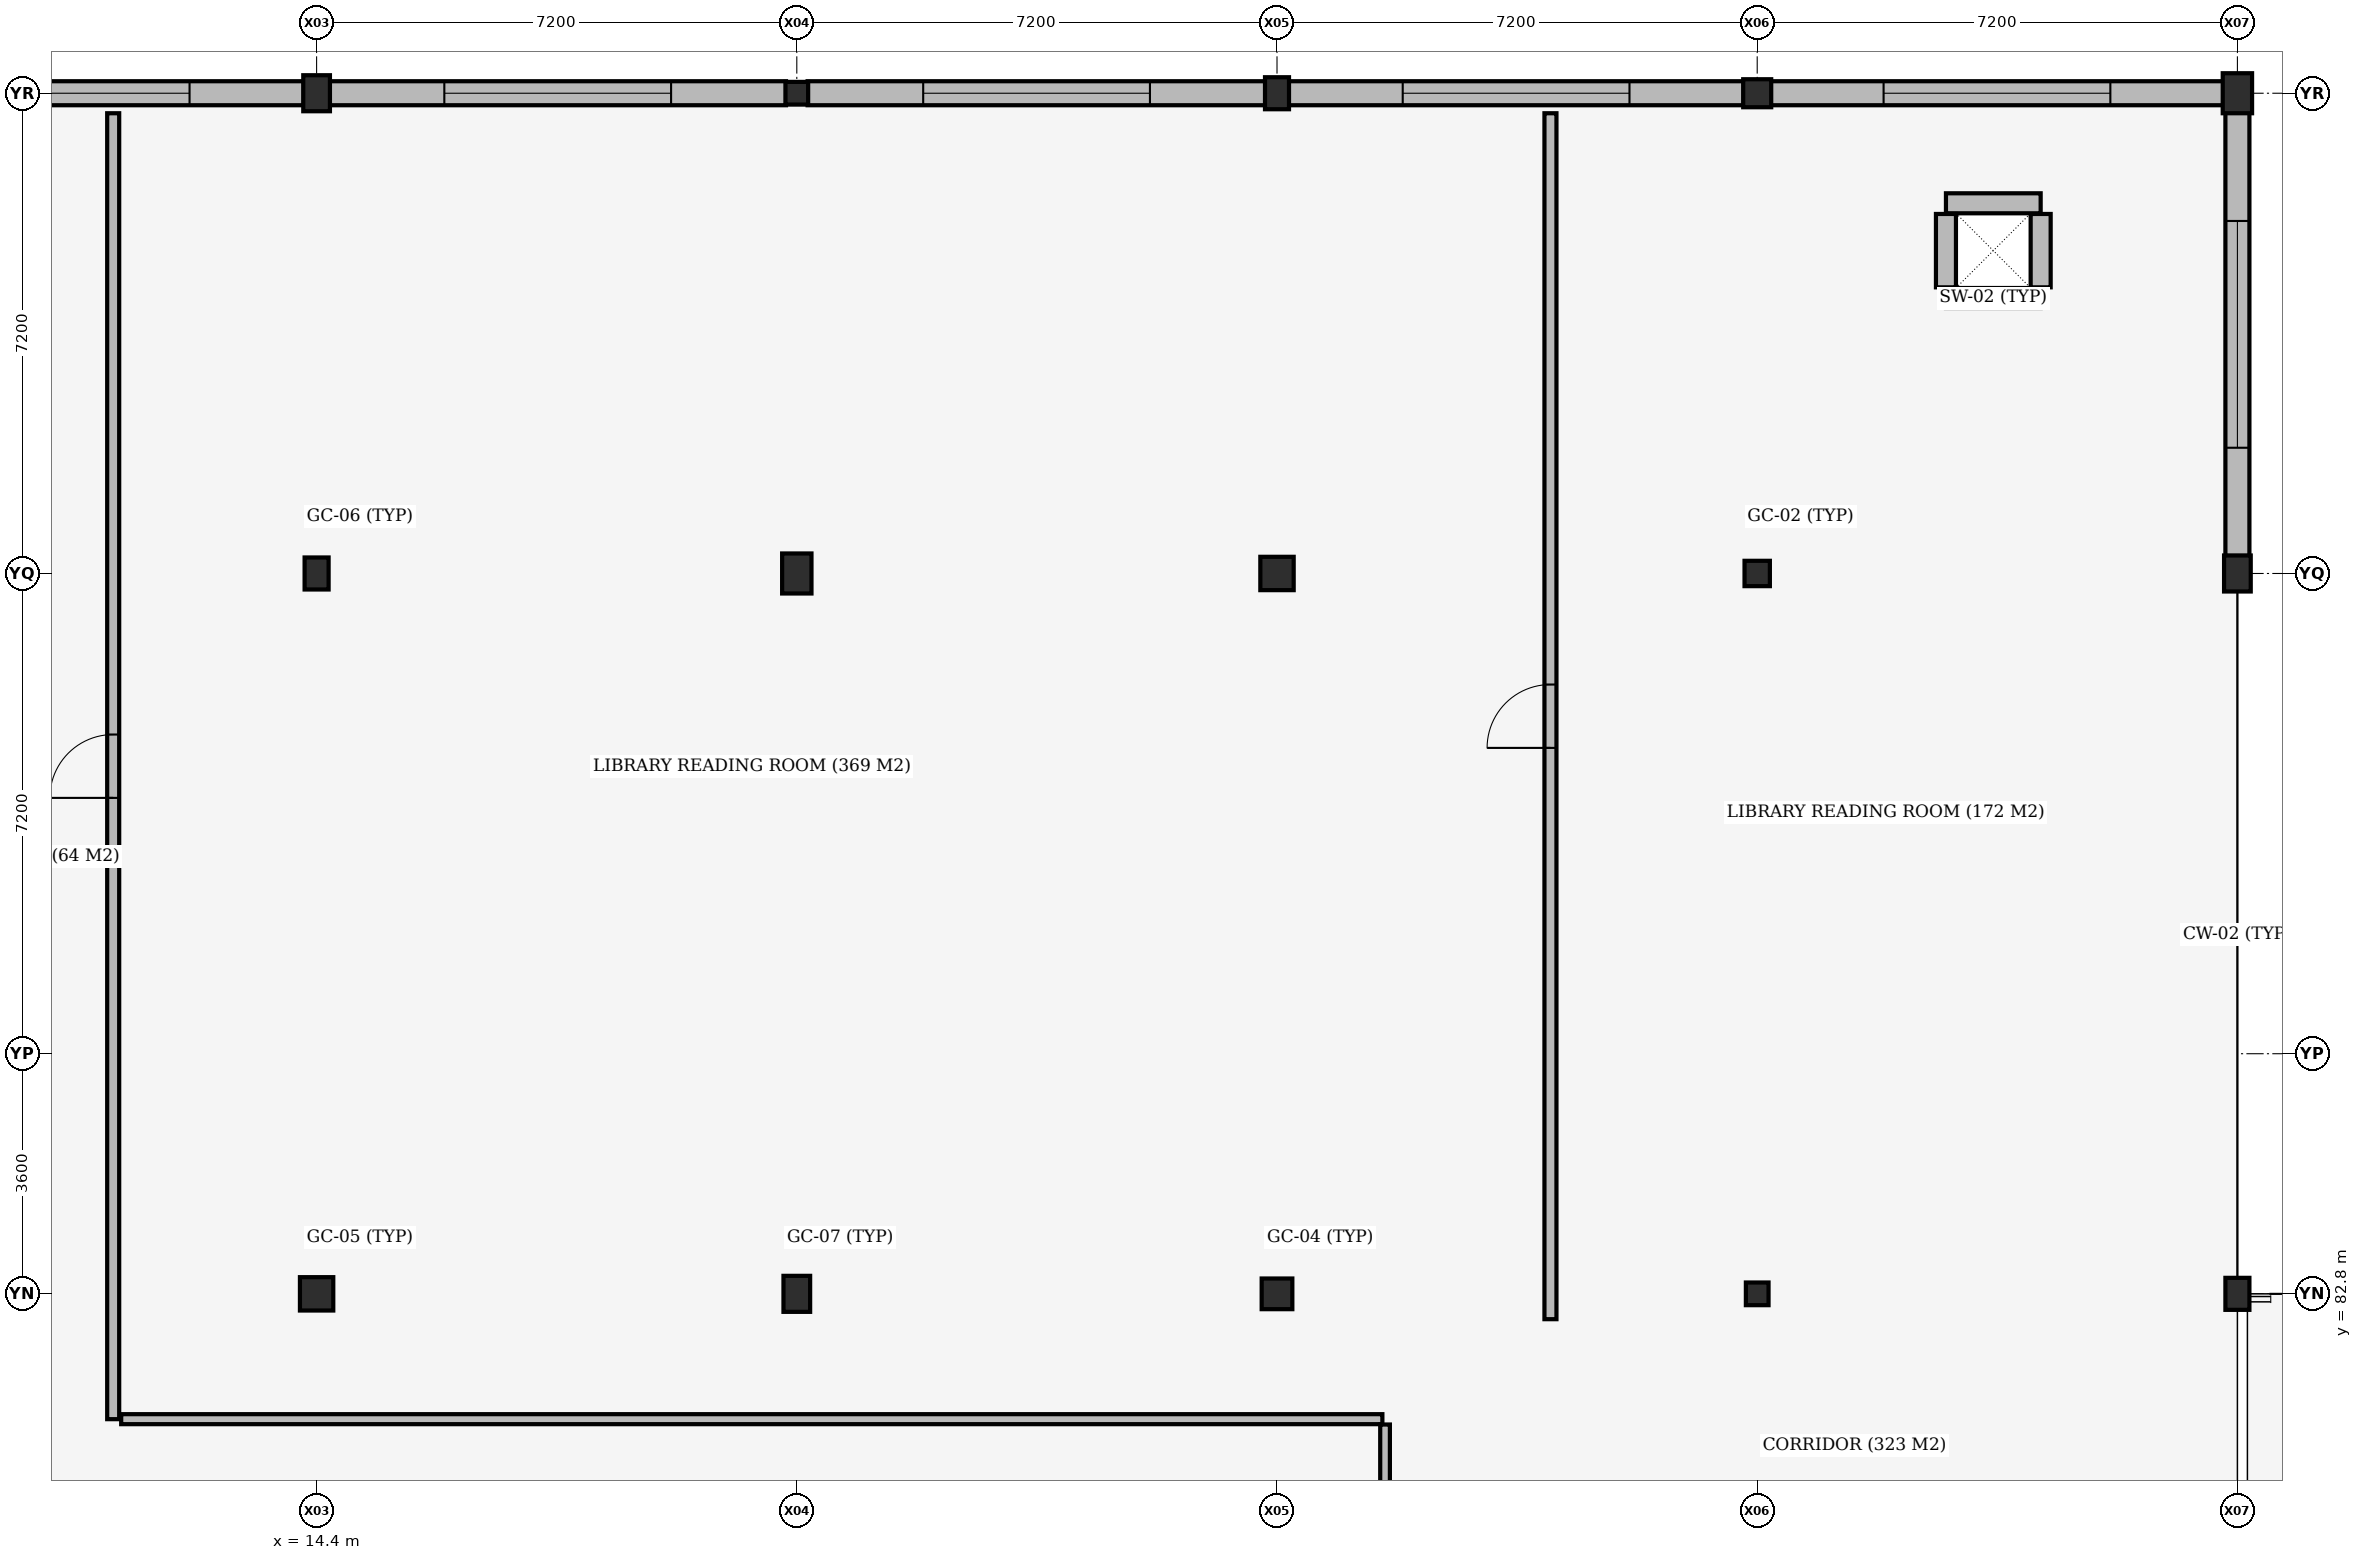
"""IFC4 building model, lengths in metres.
Left out: names, types, materials, properties, quantities, classifications, styles, units other than length and angle.
Written with IfcOpenShell. Run it as: python <this file> out.ifc"""

import sys

from ifc_helpers import new_model, si_unit, direction, frame, frame_2d, origin, origin_2d, place, context, subcontext, project, spatial, rectangle, extrude, element, fill, save


model = new_model("IFC4")
c1 = context("Model", 3, precision=1e-05, world=origin(), true_north=direction((0.0, 1.0)))
c2 = subcontext(c1, "Body", "Model", "MODEL_VIEW")
j1 = project(units=[si_unit("LENGTHUNIT", "METRE"), si_unit("PLANEANGLEUNIT", "RADIAN")], contexts=[c1])
p1 = place(None, origin())
s1 = spatial("IfcSite", under=j1, at=p1, CompositionType="ELEMENT")
p2 = place(p1, origin())
s2 = spatial("IfcBuilding", under=s1, at=p2, CompositionType="ELEMENT")
p3 = place(p2, frame((0.0, 0.0, 9.6)))
s3 = spatial("IfcBuildingStorey", under=s2, at=p3, CompositionType="ELEMENT", Elevation=9.6)
p4 = place(p3, frame((38.83, 97.73, 0.0), z_axis=(0.0, 0.0, 1.0), x_axis=(1.0, 0.0, 0.0)))
e1 = element("IfcWall", 1, at=p4, inside=s3, PredefinedType="SHEAR", context=c2, shape_type="SweptSolid", body=[
    extrude(rectangle(XDim=1.42, YDim=0.3, at=frame_2d((0.71, 0.0))), origin(), (0.0, 0.0, 1.0), 3.96),
])
p5 = place(p3, frame((40.25, 97.89, 0.0), z_axis=(0.0, 0.0, 1.0), x_axis=(0.0, 1.0, 0.0)))
e2 = element("IfcWall", 2, at=p5, inside=s3, PredefinedType="SHEAR", context=c2, shape_type="SweptSolid", body=[
    extrude(rectangle(XDim=1.1, YDim=0.3, at=frame_2d((0.55, 0.0))), origin(), (0.0, 0.0, 1.0), 3.96),
])
p6 = place(p3, frame((40.25, 99.15, 0.0), z_axis=(0.0, 0.0, 1.0), x_axis=(-1.0, 0.0, 0.0)))
e3 = element("IfcWall", 3, at=p6, inside=s3, PredefinedType="SHEAR", context=c2, shape_type="SweptSolid", body=[
    extrude(rectangle(XDim=1.42, YDim=0.3, at=frame_2d((0.71, 0.0))), origin(), (0.0, 0.0, 1.0), 3.96),
])
p7 = place(p3, frame((38.83, 98.99, 0.0), z_axis=(0.0, 0.0, 1.0), x_axis=(0.0, -1.0, 0.0)))
e4 = element("IfcWall", 4, at=p7, inside=s3, PredefinedType="SHEAR", context=c2, shape_type="SweptSolid", body=[
    extrude(rectangle(XDim=1.1, YDim=0.3, at=frame_2d((0.55, 0.0))), origin(), (0.0, 0.0, 1.0), 3.96),
])
p8 = place(p3, frame((14.4, 82.8, 0.0), z_axis=(0.0, 0.0, 1.0), x_axis=(1.0, 0.0, 0.0)))
e5 = element("IfcColumn", 5, at=p8, inside=s3, PredefinedType="COLUMN", context=c2, shape_type="SweptSolid", body=[
    extrude(rectangle(XDim=0.5, YDim=0.5, at=origin_2d()), origin(), (0.0, 0.0, 1.0), 3.89),
])
p9 = place(p3, frame((14.4, 93.6, 0.0), z_axis=(0.0, 0.0, 1.0), x_axis=(1.0, 0.0, 0.0)))
e6 = element("IfcColumn", 6, at=p9, inside=s3, PredefinedType="COLUMN", context=c2, shape_type="SweptSolid", body=[
    extrude(rectangle(XDim=0.36, YDim=0.48, at=origin_2d()), origin(), (0.0, 0.0, 1.0), 3.89),
])
for number, where, z_axis, x_axis in (
    (7, (14.4, 100.8, 0.0), (0.0, 0.0, 1.0), (1.0, 0.0, 0.0)),
    (8, (21.6, 82.8, 0.0), (0.0, 0.0, 1.0), (1.0, 0.0, 0.0)),
):
    element("IfcColumn", number, at=place(p3, frame(where, z_axis=z_axis, x_axis=x_axis)), inside=s3, PredefinedType="COLUMN", context=c2, shape_type="SweptSolid", body=[
        extrude(rectangle(XDim=0.4, YDim=0.54, at=origin_2d()), origin(), (0.0, 0.0, 1.0), 3.89),
    ])
p10 = place(p3, frame((21.6, 93.6, 0.0), z_axis=(0.0, 0.0, 1.0), x_axis=(1.0, 0.0, 0.0)))
e9 = element("IfcColumn", 9, at=p10, inside=s3, PredefinedType="COLUMN", context=c2, shape_type="SweptSolid", body=[
    extrude(rectangle(XDim=0.44, YDim=0.6, at=origin_2d()), origin(), (0.0, 0.0, 1.0), 3.89),
])
p11 = place(p3, frame((21.6, 100.8, 0.0), z_axis=(0.0, 0.0, 1.0), x_axis=(1.0, 0.0, 0.0)))
e10 = element("IfcColumn", 10, at=p11, inside=s3, PredefinedType="COLUMN", context=c2, shape_type="SweptSolid", body=[
    extrude(rectangle(XDim=0.34, YDim=0.34, at=origin_2d()), origin(), (0.0, 0.0, 1.0), 3.89),
])
p12 = place(p3, frame((28.8, 82.8, 0.0), z_axis=(0.0, 0.0, 1.0), x_axis=(1.0, 0.0, 0.0)))
e11 = element("IfcColumn", 11, at=p12, inside=s3, PredefinedType="COLUMN", context=c2, shape_type="SweptSolid", body=[
    extrude(rectangle(XDim=0.46, YDim=0.46, at=origin_2d()), origin(), (0.0, 0.0, 1.0), 3.89),
])
p13 = place(p3, frame((28.8, 93.6, 0.0), z_axis=(0.0, 0.0, 1.0), x_axis=(1.0, 0.0, 0.0)))
e12 = element("IfcColumn", 12, at=p13, inside=s3, PredefinedType="COLUMN", context=c2, shape_type="SweptSolid", body=[
    extrude(rectangle(XDim=0.5, YDim=0.5, at=origin_2d()), origin(), (0.0, 0.0, 1.0), 3.89),
])
p14 = place(p3, frame((28.8, 100.8, 0.0), z_axis=(0.0, 0.0, 1.0), x_axis=(1.0, 0.0, 0.0)))
e13 = element("IfcColumn", 13, at=p14, inside=s3, PredefinedType="COLUMN", context=c2, shape_type="SweptSolid", body=[
    extrude(rectangle(XDim=0.36, YDim=0.48, at=origin_2d()), origin(), (0.0, 0.0, 1.0), 3.89),
])
p15 = place(p3, frame((36.0, 82.8, 0.0), z_axis=(0.0, 0.0, 1.0), x_axis=(1.0, 0.0, 0.0)))
e14 = element("IfcColumn", 14, at=p15, inside=s3, PredefinedType="COLUMN", context=c2, shape_type="SweptSolid", body=[
    extrude(rectangle(XDim=0.34, YDim=0.34, at=origin_2d()), origin(), (0.0, 0.0, 1.0), 3.89),
])
p16 = place(p3, frame((36.0, 93.6, 0.0), z_axis=(0.0, 0.0, 1.0), x_axis=(1.0, 0.0, 0.0)))
e15 = element("IfcColumn", 15, at=p16, inside=s3, PredefinedType="COLUMN", context=c2, shape_type="SweptSolid", body=[
    extrude(rectangle(XDim=0.38, YDim=0.38, at=origin_2d()), origin(), (0.0, 0.0, 1.0), 3.89),
])
p17 = place(p3, frame((36.0, 100.8, 0.0), z_axis=(0.0, 0.0, 1.0), x_axis=(1.0, 0.0, 0.0)))
e16 = element("IfcColumn", 16, at=p17, inside=s3, PredefinedType="COLUMN", context=c2, shape_type="SweptSolid", body=[
    extrude(rectangle(XDim=0.42, YDim=0.42, at=origin_2d()), origin(), (0.0, 0.0, 1.0), 3.89),
])
p18 = place(p3, frame((43.2, 82.8, 0.0), z_axis=(0.0, 0.0, 1.0), x_axis=(1.0, 0.0, 0.0)))
e17 = element("IfcColumn", 17, at=p18, inside=s3, PredefinedType="COLUMN", context=c2, shape_type="SweptSolid", body=[
    extrude(rectangle(XDim=0.36, YDim=0.48, at=origin_2d()), origin(), (0.0, 0.0, 1.0), 3.89),
])
p19 = place(p3, frame((43.2, 93.6, 0.0), z_axis=(0.0, 0.0, 1.0), x_axis=(1.0, 0.0, 0.0)))
e18 = element("IfcColumn", 18, at=p19, inside=s3, PredefinedType="COLUMN", context=c2, shape_type="SweptSolid", body=[
    extrude(rectangle(XDim=0.4, YDim=0.54, at=origin_2d()), origin(), (0.0, 0.0, 1.0), 3.89),
])
p20 = place(p3, frame((43.2, 100.8, 0.0), z_axis=(0.0, 0.0, 1.0), x_axis=(1.0, 0.0, 0.0)))
e19 = element("IfcColumn", 19, at=p20, inside=s3, PredefinedType="COLUMN", context=c2, shape_type="SweptSolid", body=[
    extrude(rectangle(XDim=0.44, YDim=0.6, at=origin_2d()), origin(), (0.0, 0.0, 1.0), 3.89),
])
p21 = place(p3, frame((7.382, 100.8, 0.0), z_axis=(0.0, 0.0, 1.0), x_axis=(1.0, 0.0, 0.0)))
e20 = element("IfcWall", 20, at=p21, inside=s3, PredefinedType="STANDARD", context=c2, shape_type="SweptSolid", body=[
    extrude(rectangle(XDim=6.826, YDim=0.36, at=frame_2d((3.413, 0.0))), origin(), (0.0, 0.0, 1.0), 3.25),
])
p22 = place(p21, frame((1.713, 0.0, 0.9)))
e21 = element("IfcOpeningElement", 21, at=p22, cuts=e20, PredefinedType="OPENING", context=c2, shape_type="SweptSolid", body=[
    extrude(rectangle(XDim=3.4, YDim=1.5, at=frame_2d((1.7, 0.75))), frame((0.0, 0.19, 0.0), z_axis=(0.0, -1.0, 0.0), x_axis=(1.0, 0.0, 0.0)), (0.0, 0.0, 1.0), 0.38),
])
p23 = place(p3, frame((14.592, 100.8, 0.0), z_axis=(0.0, 0.0, 1.0), x_axis=(1.0, 0.0, 0.0)))
e22 = element("IfcWall", 22, at=p23, inside=s3, PredefinedType="STANDARD", context=c2, shape_type="SweptSolid", body=[
    extrude(rectangle(XDim=6.846, YDim=0.36, at=frame_2d((3.423, 0.0))), origin(), (0.0, 0.0, 1.0), 3.15),
])
p24 = place(p23, frame((1.723, 0.0, 0.9)))
e23 = element("IfcOpeningElement", 23, at=p24, cuts=e22, PredefinedType="OPENING", context=c2, shape_type="SweptSolid", body=[
    extrude(rectangle(XDim=3.4, YDim=1.5, at=frame_2d((1.7, 0.75))), frame((0.0, 0.19, 0.0), z_axis=(0.0, -1.0, 0.0), x_axis=(1.0, 0.0, 0.0)), (0.0, 0.0, 1.0), 0.38),
])
p25 = place(p3, frame((21.762, 100.8, 0.0), z_axis=(0.0, 0.0, 1.0), x_axis=(1.0, 0.0, 0.0)))
e24 = element("IfcWall", 24, at=p25, inside=s3, PredefinedType="STANDARD", context=c2, shape_type="SweptSolid", body=[
    extrude(rectangle(XDim=6.866, YDim=0.36, at=frame_2d((3.433, 0.0))), origin(), (0.0, 0.0, 1.0), 3.15),
])
p26 = place(p25, frame((1.733, 0.0, 0.9)))
e25 = element("IfcOpeningElement", 25, at=p26, cuts=e24, PredefinedType="OPENING", context=c2, shape_type="SweptSolid", body=[
    extrude(rectangle(XDim=3.4, YDim=1.5, at=frame_2d((1.7, 0.75))), frame((0.0, 0.19, 0.0), z_axis=(0.0, -1.0, 0.0), x_axis=(1.0, 0.0, 0.0)), (0.0, 0.0, 1.0), 0.38),
])
p27 = place(p3, frame((28.972, 100.8, 0.0), z_axis=(0.0, 0.0, 1.0), x_axis=(1.0, 0.0, 0.0)))
e26 = element("IfcWall", 26, at=p27, inside=s3, PredefinedType="STANDARD", context=c2, shape_type="SweptSolid", body=[
    extrude(rectangle(XDim=6.826, YDim=0.36, at=frame_2d((3.413, 0.0))), origin(), (0.0, 0.0, 1.0), 3.37),
])
p28 = place(p27, frame((1.713, 0.0, 0.9)))
e27 = element("IfcOpeningElement", 27, at=p28, cuts=e26, PredefinedType="OPENING", context=c2, shape_type="SweptSolid", body=[
    extrude(rectangle(XDim=3.4, YDim=1.5, at=frame_2d((1.7, 0.75))), frame((0.0, 0.19, 0.0), z_axis=(0.0, -1.0, 0.0), x_axis=(1.0, 0.0, 0.0)), (0.0, 0.0, 1.0), 0.38),
])
p29 = place(p3, frame((36.202, 100.8, 0.0), z_axis=(0.0, 0.0, 1.0), x_axis=(1.0, 0.0, 0.0)))
e28 = element("IfcWall", 28, at=p29, inside=s3, PredefinedType="STANDARD", context=c2, shape_type="SweptSolid", body=[
    extrude(rectangle(XDim=6.786, YDim=0.36, at=frame_2d((3.393, 0.0))), origin(), (0.0, 0.0, 1.0), 3.31),
])
p30 = place(p29, frame((1.693, 0.0, 0.9)))
e29 = element("IfcOpeningElement", 29, at=p30, cuts=e28, PredefinedType="OPENING", context=c2, shape_type="SweptSolid", body=[
    extrude(rectangle(XDim=3.4, YDim=1.5, at=frame_2d((1.7, 0.75))), frame((0.0, 0.19, 0.0), z_axis=(0.0, -1.0, 0.0), x_axis=(1.0, 0.0, 0.0)), (0.0, 0.0, 1.0), 0.38),
])
p31 = place(p3, frame((43.2, 100.508, 0.0), z_axis=(0.0, 0.0, 1.0), x_axis=(0.0, -1.0, 0.0)))
e30 = element("IfcWall", 30, at=p31, inside=s3, PredefinedType="STANDARD", context=c2, shape_type="SweptSolid", body=[
    extrude(rectangle(XDim=6.646, YDim=0.36, at=frame_2d((3.323, 0.0))), origin(), (0.0, 0.0, 1.0), 3.15),
])
p32 = place(p31, frame((1.623, 0.0, 0.9)))
e31 = element("IfcOpeningElement", 31, at=p32, cuts=e30, PredefinedType="OPENING", context=c2, shape_type="SweptSolid", body=[
    extrude(rectangle(XDim=3.4, YDim=1.5, at=frame_2d((1.7, 0.75))), frame((0.0, 0.19, 0.0), z_axis=(0.0, -1.0, 0.0), x_axis=(1.0, 0.0, 0.0)), (0.0, 0.0, 1.0), 0.38),
])
p33 = place(p3, frame((11.47, 80.921, 0.0), z_axis=(0.0, 0.0, 1.0), x_axis=(1.0, 0.0, 0.0)))
e32 = element("IfcWall", 32, at=p33, inside=s3, PredefinedType="PARTITIONING", context=c2, shape_type="SweptSolid", body=[
    extrude(rectangle(XDim=18.91, YDim=0.15, at=frame_2d((9.455, 0.0))), origin(), (0.0, 0.0, 1.0), 3.15),
])
p34 = place(p3, frame((11.35, 80.921, 0.0), z_axis=(0.0, 0.0, 1.0), x_axis=(0.0, 1.0, 0.0)))
e33 = element("IfcWall", 33, at=p34, inside=s3, PredefinedType="PARTITIONING", context=c2, shape_type="SweptSolid", body=[
    extrude(rectangle(XDim=19.579, YDim=0.18, at=frame_2d((9.79, 0.0))), origin(), (0.0, 0.0, 1.0), 3.31),
])
p35 = place(p34, frame((9.314, 0.0, 0.0)))
e34 = element("IfcOpeningElement", 34, at=p35, cuts=e33, PredefinedType="OPENING", context=c2, shape_type="SweptSolid", body=[
    extrude(rectangle(XDim=0.95, YDim=2.15, at=frame_2d((0.475, 1.075))), frame((0.0, 0.1, 0.0), z_axis=(0.0, -1.0, 0.0), x_axis=(1.0, 0.0, 0.0)), (0.0, 0.0, 1.0), 0.2),
])
p36 = place(p3, frame((32.9, 82.42, 0.0), z_axis=(0.0, 0.0, 1.0), x_axis=(0.0, 1.0, 0.0)))
e35 = element("IfcWall", 35, at=p36, inside=s3, PredefinedType="PARTITIONING", context=c2, shape_type="SweptSolid", body=[
    extrude(rectangle(XDim=18.08, YDim=0.18, at=frame_2d((9.04, 0.0))), origin(), (0.0, 0.0, 1.0), 3.15),
])
p37 = place(p36, frame((8.565, 0.0, 0.0)))
e36 = element("IfcOpeningElement", 36, at=p37, cuts=e35, PredefinedType="OPENING", context=c2, shape_type="SweptSolid", body=[
    extrude(rectangle(XDim=0.95, YDim=2.15, at=frame_2d((0.475, 1.075))), frame((0.0, 0.1, 0.0), z_axis=(0.0, -1.0, 0.0), x_axis=(1.0, 0.0, 0.0)), (0.0, 0.0, 1.0), 0.2),
])
p38 = place(p3, frame((30.42, 80.841, 0.0), z_axis=(0.0, 0.0, 1.0), x_axis=(0.0, -1.0, 0.0)))
e37 = element("IfcWall", 37, at=p38, inside=s3, PredefinedType="PLUMBINGWALL", context=c2, shape_type="SweptSolid", body=[
    extrude(rectangle(XDim=29.208, YDim=0.145, at=frame_2d((14.604, 0.0))), origin(), (0.0, 0.0, 1.0), 3.25),
])
p39 = place(p38, frame((14.154, 0.0, 0.0)))
e38 = element("IfcOpeningElement", 38, at=p39, cuts=e37, PredefinedType="OPENING", context=c2, shape_type="SweptSolid", body=[
    extrude(rectangle(XDim=0.9, YDim=2.1, at=frame_2d((0.45, 1.05))), frame((0.0, 0.083, 0.0), z_axis=(0.0, -1.0, 0.0), x_axis=(1.0, 0.0, 0.0)), (0.0, 0.0, 1.0), 0.165),
])
p40 = place(p22, origin())
e39 = element("IfcWindow", 39, at=p40, inside=s3, PartitioningType="DOUBLE_PANEL_VERTICAL", PredefinedType="WINDOW", context=c2, shape_type="SweptSolid", body=[
    extrude(rectangle(XDim=3.4, YDim=1.5, at=frame_2d((1.7, 0.75))), frame((0.0, 0.03, 0.0), z_axis=(0.0, -1.0, 0.0), x_axis=(1.0, 0.0, 0.0)), (0.0, 0.0, 1.0), 0.06),
])
fill(e21, e39)
p41 = place(p24, origin())
e40 = element("IfcWindow", 40, at=p41, inside=s3, PartitioningType="DOUBLE_PANEL_VERTICAL", PredefinedType="WINDOW", context=c2, shape_type="SweptSolid", body=[
    extrude(rectangle(XDim=3.4, YDim=1.5, at=frame_2d((1.7, 0.75))), frame((0.0, 0.03, 0.0), z_axis=(0.0, -1.0, 0.0), x_axis=(1.0, 0.0, 0.0)), (0.0, 0.0, 1.0), 0.06),
])
fill(e23, e40)
p42 = place(p26, origin())
e41 = element("IfcWindow", 41, at=p42, inside=s3, PartitioningType="DOUBLE_PANEL_VERTICAL", PredefinedType="WINDOW", context=c2, shape_type="SweptSolid", body=[
    extrude(rectangle(XDim=3.4, YDim=1.5, at=frame_2d((1.7, 0.75))), frame((0.0, 0.03, 0.0), z_axis=(0.0, -1.0, 0.0), x_axis=(1.0, 0.0, 0.0)), (0.0, 0.0, 1.0), 0.06),
])
fill(e25, e41)
p43 = place(p28, origin())
e42 = element("IfcWindow", 42, at=p43, inside=s3, PartitioningType="DOUBLE_PANEL_VERTICAL", PredefinedType="WINDOW", context=c2, shape_type="SweptSolid", body=[
    extrude(rectangle(XDim=3.4, YDim=1.5, at=frame_2d((1.7, 0.75))), frame((0.0, 0.03, 0.0), z_axis=(0.0, -1.0, 0.0), x_axis=(1.0, 0.0, 0.0)), (0.0, 0.0, 1.0), 0.06),
])
fill(e27, e42)
p44 = place(p30, origin())
e43 = element("IfcWindow", 43, at=p44, inside=s3, PartitioningType="DOUBLE_PANEL_VERTICAL", PredefinedType="WINDOW", context=c2, shape_type="SweptSolid", body=[
    extrude(rectangle(XDim=3.4, YDim=1.5, at=frame_2d((1.7, 0.75))), frame((0.0, 0.03, 0.0), z_axis=(0.0, -1.0, 0.0), x_axis=(1.0, 0.0, 0.0)), (0.0, 0.0, 1.0), 0.06),
])
fill(e29, e43)
p45 = place(p32, origin())
e44 = element("IfcWindow", 44, at=p45, inside=s3, PartitioningType="DOUBLE_PANEL_VERTICAL", PredefinedType="WINDOW", context=c2, shape_type="SweptSolid", body=[
    extrude(rectangle(XDim=3.4, YDim=1.5, at=frame_2d((1.7, 0.75))), frame((0.0, 0.03, 0.0), z_axis=(0.0, -1.0, 0.0), x_axis=(1.0, 0.0, 0.0)), (0.0, 0.0, 1.0), 0.06),
])
fill(e31, e44)
p46 = place(p35, origin())
e45 = element("IfcDoor", 45, at=p46, inside=s3, OperationType="SINGLE_SWING_LEFT", PredefinedType="DOOR", context=c2, shape_type="SweptSolid", body=[
    extrude(rectangle(XDim=0.95, YDim=2.15, at=frame_2d((0.475, 1.075))), frame((0.0, 0.025, 0.0), z_axis=(0.0, -1.0, 0.0), x_axis=(1.0, 0.0, 0.0)), (0.0, 0.0, 1.0), 0.05),
])
fill(e34, e45)
p47 = place(p37, origin())
e46 = element("IfcDoor", 46, at=p47, inside=s3, OperationType="SINGLE_SWING_LEFT", PredefinedType="DOOR", context=c2, shape_type="SweptSolid", body=[
    extrude(rectangle(XDim=0.95, YDim=2.15, at=frame_2d((0.475, 1.075))), frame((0.0, 0.025, 0.0), z_axis=(0.0, -1.0, 0.0), x_axis=(1.0, 0.0, 0.0)), (0.0, 0.0, 1.0), 0.05),
])
fill(e36, e46)
save(model, sys.argv[1])
